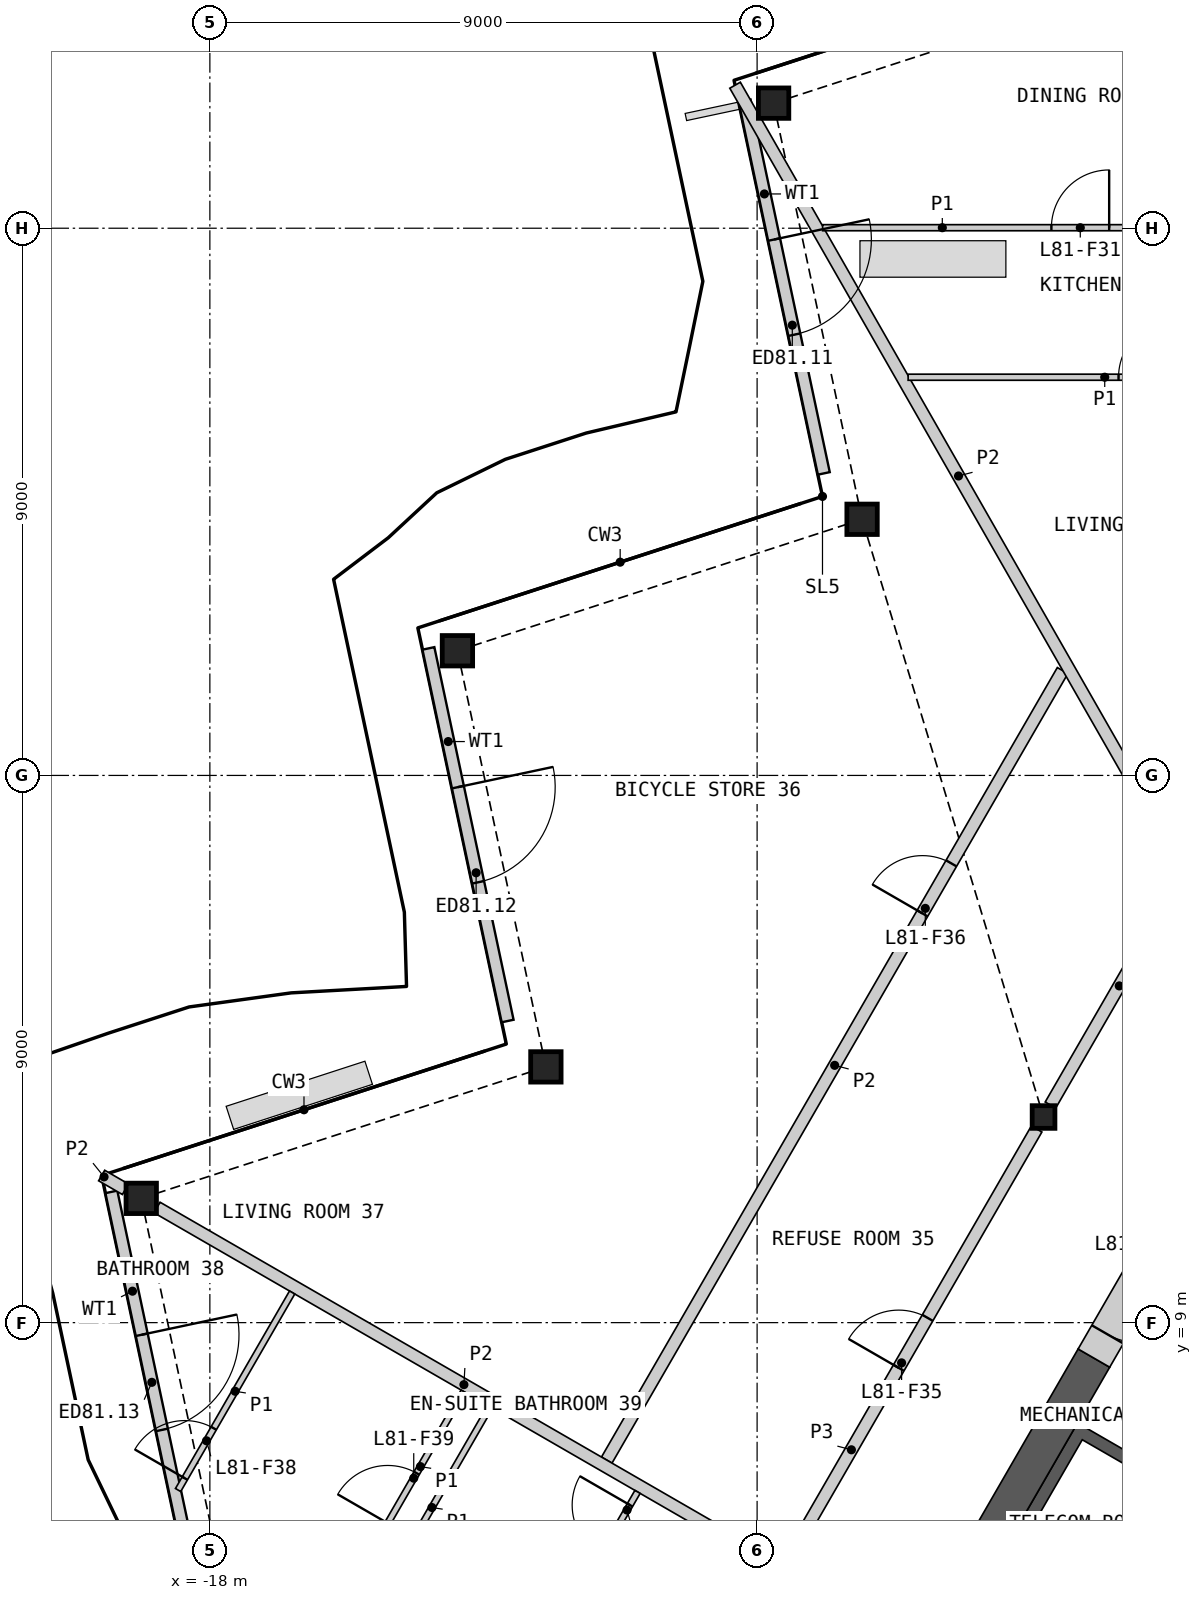
"""IFC4 building model, lengths in metres.
Left out: names, types, materials, properties, quantities, classifications, styles, units other than length and angle.
Written with IfcOpenShell. Run it as: python <this file> out.ifc"""

import sys

from ifc_helpers import new_model, si_unit, direction, frame, frame_2d, origin, origin_2d, place, context, subcontext, project, spatial, polyline, rectangle, hollow_rectangle, i_section, outline, extrude, element, fill, save


model = new_model("IFC4")
c1 = context("Model", 3, precision=1e-05, world=origin(), true_north=direction((0.0, 1.0)))
c2 = subcontext(c1, "Body", "Model", "MODEL_VIEW")
j1 = project(units=[si_unit("LENGTHUNIT", "METRE"), si_unit("PLANEANGLEUNIT", "RADIAN")], contexts=[c1])
p1 = place(None, origin())
s1 = spatial("IfcSite", under=j1, at=p1, CompositionType="ELEMENT")
p2 = place(p1, origin())
s2 = spatial("IfcBuilding", under=s1, at=p2, CompositionType="ELEMENT")
p3 = place(p2, frame((0.0, 0.0, 364.4)))
s3 = spatial("IfcBuildingStorey", under=s2, at=p3, CompositionType="ELEMENT", Elevation=364.4)
for number, where, z_axis, x_axis in (
    (1, (-8.729, 29.057, 0.0), (0.0, 0.0, 1.0), (1.0, 0.0, 0.0)),
    (2, (-7.274, 22.213, 0.0), (0.0, 0.0, 1.0), (1.0, 0.0, 0.0)),
    (3, (-13.929, 20.051, 0.0), (0.0, 0.0, 1.0), (1.0, 0.0, 0.0)),
    (4, (-12.474, 13.206, 0.0), (0.0, 0.0, 1.0), (1.0, 0.0, 0.0)),
    (5, (-19.129, 11.044, 0.0), (0.0, 0.0, 1.0), (1.0, 0.0, 0.0)),
):
    element("IfcColumn", number, at=place(p3, frame(where, z_axis=z_axis, x_axis=x_axis)), inside=s3, PredefinedType="COLUMN", context=c2, shape_type="SweptSolid", body=[
        extrude(hollow_rectangle(XDim=0.5, YDim=0.5, WallThickness=0.03, at=origin_2d()), origin(), (0.0, 0.0, 1.0), 3.4),
    ])
p4 = place(p3, frame((-4.289, 12.382, 0.0), z_axis=(0.0, 0.0, 1.0), x_axis=(1.0, 0.0, 0.0)))
e6 = element("IfcColumn", 6, at=p4, inside=s3, PredefinedType="COLUMN", context=c2, shape_type="SweptSolid", body=[
    extrude(i_section(OverallWidth=0.374, OverallDepth=0.372, WebThickness=0.016, FlangeThickness=0.026, at=origin_2d()), origin(), (0.0, 0.0, 1.0), 3.4),
])
p5 = place(p3, frame((-9.206, 29.096, 0.0), z_axis=(0.0, 0.0, 1.0), x_axis=(0.207889514624, -0.978152314167, 0.0)))
e7 = element("IfcWall", 7, at=p5, inside=s3, PredefinedType="SOLIDWALL", context=c2, shape_type="SweptSolid", body=[
    extrude(rectangle(XDim=6.265, YDim=0.2, at=frame_2d((3.133, 0.0))), origin(), (0.0, 0.0, 1.0), 2.634),
])
p6 = place(p5, frame((2.333, 0.0, 0.0)))
e8 = element("IfcOpeningElement", 8, at=p6, cuts=e7, PredefinedType="OPENING", context=c2, shape_type="SweptSolid", body=[
    extrude(rectangle(XDim=1.6, YDim=2.25, at=frame_2d((0.8, 1.125))), frame((0.0, 0.11, 0.0), z_axis=(0.0, -1.0, 0.0), x_axis=(1.0, 0.0, 0.0)), (0.0, 0.0, 1.0), 0.22),
])
p7 = place(p3, frame((-14.406, 20.089, 0.0), z_axis=(0.0, 0.0, 1.0), x_axis=(0.207889514624, -0.978152314167, 0.0)))
e9 = element("IfcWall", 9, at=p7, inside=s3, PredefinedType="SOLIDWALL", context=c2, shape_type="SweptSolid", body=[
    extrude(rectangle(XDim=6.265, YDim=0.2, at=frame_2d((3.133, 0.0))), origin(), (0.0, 0.0, 1.0), 2.634),
])
p8 = place(p7, frame((2.333, 0.0, 0.0)))
e10 = element("IfcOpeningElement", 10, at=p8, cuts=e9, PredefinedType="OPENING", context=c2, shape_type="SweptSolid", body=[
    extrude(rectangle(XDim=1.6, YDim=2.25, at=frame_2d((0.8, 1.125))), frame((0.0, 0.11, 0.0), z_axis=(0.0, -1.0, 0.0), x_axis=(1.0, 0.0, 0.0)), (0.0, 0.0, 1.0), 0.22),
])
p9 = place(p3, frame((-19.62, 11.15, 0.0), z_axis=(0.0, 0.0, 1.0), x_axis=(0.207933518746, -0.97814296081, 0.0)))
e11 = element("IfcWall", 11, at=p9, inside=s3, PredefinedType="SOLIDWALL", context=c2, shape_type="SweptSolid", body=[
    extrude(rectangle(XDim=6.678, YDim=0.2, at=frame_2d((3.339, 0.0))), origin(), (0.0, 0.0, 1.0), 2.634),
])
p10 = place(p9, frame((2.402, 0.0, 0.0)))
e12 = element("IfcOpeningElement", 12, at=p10, cuts=e11, PredefinedType="OPENING", context=c2, shape_type="SweptSolid", body=[
    extrude(rectangle(XDim=1.6, YDim=2.25, at=frame_2d((0.8, 1.125))), frame((0.0, 0.11, 0.0), z_axis=(0.0, -1.0, 0.0), x_axis=(1.0, 0.0, 0.0)), (0.0, 0.0, 1.0), 0.22),
])
p11 = place(p3, origin())
e13 = element("IfcWall", 13, at=p11, inside=s3, PredefinedType="SHEAR", context=c2, shape_type="SweptSolid", body=[
    extrude(outline(polyline([(-4.96, 0.208), (-7.131, 1.461), (-3.731, 7.35), (-1.561, 6.097), (-1.66, 5.924), (-3.652, 7.074), (-5.752, 3.437), (-3.76, 2.287), (-3.861, 2.113), (-5.852, 3.263), (-6.852, 1.531), (-4.861, 0.381), (-4.96, 0.208)])), origin(), (0.0, 0.0, 1.0), 3.1),
])
p12 = place(p3, frame((-1.631, 5.776, 0.0), z_axis=(0.0, 0.0, 1.0), x_axis=(-0.499992876559, -0.866029516466, 0.0)))
e14 = element("IfcWall", 14, at=p12, inside=s3, PredefinedType="SOLIDWALL", context=c2, shape_type="SweptSolid", body=[
    extrude(rectangle(XDim=6.486, YDim=0.2, at=frame_2d((3.243, 0.0))), origin(), (0.0, 0.0, 1.0), 3.1),
])
p13 = place(p12, frame((1.537, 0.0, 0.0)))
e15 = element("IfcOpeningElement", 15, at=p13, cuts=e14, PredefinedType="OPENING", context=c2, shape_type="SweptSolid", body=[
    extrude(rectangle(XDim=0.9, YDim=2.1, at=frame_2d((0.45, 1.05))), frame((0.0, 0.11, 0.0), z_axis=(0.0, -1.0, 0.0), x_axis=(1.0, 0.0, 0.0)), (0.0, 0.0, 1.0), 0.22),
])
p14 = place(p12, frame((4.837, 0.0, 0.0)))
e16 = element("IfcOpeningElement", 16, at=p14, cuts=e14, PredefinedType="OPENING", context=c2, shape_type="SweptSolid", body=[
    extrude(rectangle(XDim=0.9, YDim=2.1, at=frame_2d((0.45, 1.05))), frame((0.0, 0.11, 0.0), z_axis=(0.0, -1.0, 0.0), x_axis=(1.0, 0.0, 0.0)), (0.0, 0.0, 1.0), 0.22),
])
p15 = place(p3, frame((-3.461, 8.417, 0.0), z_axis=(0.0, 0.0, 1.0), x_axis=(-0.50000391502, -0.866023143435, 0.0)))
e17 = element("IfcWall", 17, at=p15, inside=s3, PredefinedType="SHEAR", context=c2, shape_type="SweptSolid", body=[
    extrude(rectangle(XDim=7.759, YDim=0.6, at=frame_2d((3.879, 0.0))), origin(), (0.0, 0.0, 1.0), 3.1),
])
p16 = place(p3, frame((-2.361, 10.322, 0.0), z_axis=(0.0, 0.0, 1.0), x_axis=(-0.499946605688, -0.86605622881, 0.0)))
e18 = element("IfcWall", 18, at=p16, inside=s3, PredefinedType="SHEAR", context=c2, shape_type="SweptSolid", body=[
    extrude(rectangle(XDim=2.2, YDim=0.6, at=frame_2d((1.1, 0.0))), origin(), (0.0, 0.0, 1.0), 3.1),
])
p17 = place(p16, frame((0.75, 0.0, 0.0)))
e19 = element("IfcOpeningElement", 19, at=p17, cuts=e18, PredefinedType="OPENING", context=c2, shape_type="SweptSolid", body=[
    extrude(rectangle(XDim=1.0, YDim=2.1, at=frame_2d((0.5, 1.05))), frame((0.0, 0.31, 0.0), z_axis=(0.0, -1.0, 0.0), x_axis=(1.0, 0.0, 0.0)), (0.0, 0.0, 1.0), 0.62),
])
p18 = place(p3, frame((-8.465, 5.15, 0.0), z_axis=(0.0, 0.0, 1.0), x_axis=(0.499992155518, 0.866029932751, 0.0)))
e20 = element("IfcWall", 20, at=p18, inside=s3, PredefinedType="PARTITIONING", context=c2, shape_type="SweptSolid", body=[
    extrude(rectangle(XDim=8.123, YDim=0.2, at=frame_2d((4.062, 0.0))), origin(), (0.0, 0.0, 1.0), 3.1),
])
p19 = place(p18, frame((3.587, 0.0, 0.0)))
e21 = element("IfcOpeningElement", 21, at=p19, cuts=e20, PredefinedType="OPENING", context=c2, shape_type="SweptSolid", body=[
    extrude(rectangle(XDim=0.95, YDim=2.1, at=frame_2d((0.475, 1.05))), frame((0.0, 0.11, 0.0), z_axis=(0.0, -1.0, 0.0), x_axis=(1.0, 0.0, 0.0)), (0.0, 0.0, 1.0), 0.22),
])
p20 = place(p3, frame((-4.176, 12.579, 0.0), z_axis=(0.0, 0.0, 1.0), x_axis=(0.499974648164, 0.866040040179, 0.0)))
e22 = element("IfcWall", 22, at=p20, inside=s3, PredefinedType="PARTITIONING", context=c2, shape_type="SweptSolid", body=[
    extrude(rectangle(XDim=4.525, YDim=0.2, at=frame_2d((2.263, 0.0))), origin(), (0.0, 0.0, 1.0), 3.1),
])
p21 = place(p3, frame((-11.473, 6.74, 0.0), z_axis=(0.0, 0.0, 1.0), x_axis=(0.499993542657, 0.866029131901, 0.0)))
e23 = element("IfcWall", 23, at=p21, inside=s3, PredefinedType="PARTITIONING", context=c2, shape_type="SweptSolid", body=[
    extrude(rectangle(XDim=14.994, YDim=0.2, at=frame_2d((7.497, 0.0))), origin(), (0.0, 0.0, 1.0), 2.33),
])
p22 = place(p21, frame((10.383, 0.0, 0.0)))
e24 = element("IfcOpeningElement", 24, at=p22, cuts=e23, PredefinedType="OPENING", context=c2, shape_type="SweptSolid", body=[
    extrude(rectangle(XDim=0.95, YDim=2.1, at=frame_2d((0.475, 1.05))), frame((0.0, 0.11, 0.0), z_axis=(0.0, -1.0, 0.0), x_axis=(1.0, 0.0, 0.0)), (0.0, 0.0, 1.0), 0.22),
])
p23 = place(p3, frame((-9.362, 29.352, 0.0), z_axis=(0.0, 0.0, 1.0), x_axis=(0.496351997927, -0.868121359116, 0.0)))
e25 = element("IfcWall", 25, at=p23, inside=s3, PredefinedType="PARTITIONING", context=c2, shape_type="SweptSolid", body=[
    extrude(rectangle(XDim=14.807, YDim=0.2, at=frame_2d((7.404, 0.0))), origin(), (0.0, 0.0, 1.0), 2.33),
])
p24 = place(p3, frame((-18.869, 10.894, 0.0), z_axis=(0.0, 0.0, 1.0), x_axis=(0.866023724155, -0.500002909193, 0.0)))
e26 = element("IfcWall", 26, at=p24, inside=s3, PredefinedType="PARTITIONING", context=c2, shape_type="SweptSolid", body=[
    extrude(rectangle(XDim=11.655, YDim=0.2, at=frame_2d((5.827, 0.0))), origin(), (0.0, 0.0, 1.0), 2.33),
])
p25 = place(p3, frame((-19.78, 11.42, 0.0), z_axis=(0.0, 0.0, 1.0), x_axis=(0.866104518135, -0.499862944882, 0.0)))
e27 = element("IfcWall", 27, at=p25, inside=s3, PredefinedType="PARTITIONING", context=c2, shape_type="SweptSolid", body=[
    extrude(rectangle(XDim=0.451, YDim=0.2, at=frame_2d((0.226, 0.0))), origin(), (0.0, 0.0, 1.0), 2.33),
])
p26 = place(p3, frame((-7.922, 27.009, 0.0), z_axis=(0.0, 0.0, 1.0), x_axis=(1.0, 0.0, 0.0)))
e28 = element("IfcWall", 28, at=p26, inside=s3, PredefinedType="PARTITIONING", context=c2, shape_type="SweptSolid", body=[
    extrude(rectangle(XDim=7.872, YDim=0.1, at=frame_2d((3.936, 0.0))), origin(), (0.0, 0.0, 1.0), 2.33),
])
p27 = place(p26, frame((3.762, 0.0, 0.0)))
e29 = element("IfcOpeningElement", 29, at=p27, cuts=e28, PredefinedType="OPENING", context=c2, shape_type="SweptSolid", body=[
    extrude(rectangle(XDim=0.95, YDim=2.1, at=frame_2d((0.475, 1.05))), frame((0.0, 0.06, 0.0), z_axis=(0.0, -1.0, 0.0), x_axis=(1.0, 0.0, 0.0)), (0.0, 0.0, 1.0), 0.12),
])
p28 = place(p3, frame((-6.516, 24.549, 0.0), z_axis=(0.0, 0.0, 1.0), x_axis=(1.0, 0.0, 0.0)))
e30 = element("IfcWall", 30, at=p28, inside=s3, PredefinedType="PARTITIONING", context=c2, shape_type="SweptSolid", body=[
    extrude(rectangle(XDim=6.466, YDim=0.1, at=frame_2d((3.233, 0.0))), origin(), (0.0, 0.0, 1.0), 2.33),
])
p29 = place(p28, frame((3.46, 0.0, 0.0)))
e31 = element("IfcOpeningElement", 31, at=p29, cuts=e30, PredefinedType="OPENING", context=c2, shape_type="SweptSolid", body=[
    extrude(rectangle(XDim=0.95, YDim=2.1, at=frame_2d((0.475, 1.05))), frame((0.0, 0.06, 0.0), z_axis=(0.0, -1.0, 0.0), x_axis=(1.0, 0.0, 0.0)), (0.0, 0.0, 1.0), 0.12),
])
p30 = place(p3, frame((-18.523, 6.247, 0.0), z_axis=(0.0, 0.0, 1.0), x_axis=(0.499981580887, 0.866036037803, 0.0)))
e32 = element("IfcWall", 32, at=p30, inside=s3, PredefinedType="PARTITIONING", context=c2, shape_type="SweptSolid", body=[
    extrude(rectangle(XDim=3.752, YDim=0.1, at=frame_2d((1.876, 0.0))), origin(), (0.0, 0.0, 1.0), 2.33),
])
p31 = place(p30, frame((0.222, 0.0, 0.0)))
e33 = element("IfcOpeningElement", 33, at=p31, cuts=e32, PredefinedType="OPENING", context=c2, shape_type="SweptSolid", body=[
    extrude(rectangle(XDim=0.95, YDim=2.1, at=frame_2d((0.475, 1.05))), frame((0.0, 0.06, 0.0), z_axis=(0.0, -1.0, 0.0), x_axis=(1.0, 0.0, 0.0)), (0.0, 0.0, 1.0), 0.12),
])
p32 = place(p3, frame((-15.25, 5.398, 0.0), z_axis=(0.0, 0.0, 1.0), x_axis=(0.499935029643, 0.866062911188, 0.0)))
e34 = element("IfcWall", 34, at=p32, inside=s3, PredefinedType="PARTITIONING", context=c2, shape_type="SweptSolid", body=[
    extrude(rectangle(XDim=2.85, YDim=0.1, at=frame_2d((1.425, 0.0))), origin(), (0.0, 0.0, 1.0), 2.33),
])
p33 = place(p32, frame((0.35, 0.0, 0.0)))
e35 = element("IfcOpeningElement", 35, at=p33, cuts=e34, PredefinedType="OPENING", context=c2, shape_type="SweptSolid", body=[
    extrude(rectangle(XDim=0.95, YDim=2.1, at=frame_2d((0.475, 1.05))), frame((0.0, 0.06, 0.0), z_axis=(0.0, -1.0, 0.0), x_axis=(1.0, 0.0, 0.0)), (0.0, 0.0, 1.0), 0.12),
])
p34 = place(p3, frame((-12.242, 4.008, 0.0), z_axis=(0.0, 0.0, 1.0), x_axis=(0.499948979701, 0.866054858364, 0.0)))
e36 = element("IfcWall", 36, at=p34, inside=s3, PredefinedType="PARTITIONING", context=c2, shape_type="SweptSolid", body=[
    extrude(rectangle(XDim=2.55, YDim=0.1, at=frame_2d((1.275, 0.0))), origin(), (0.0, 0.0, 1.0), 2.33),
])
p35 = place(p34, frame((1.35, 0.0, 0.0)))
e37 = element("IfcOpeningElement", 37, at=p35, cuts=e36, PredefinedType="OPENING", context=c2, shape_type="SweptSolid", body=[
    extrude(rectangle(XDim=0.95, YDim=2.1, at=frame_2d((0.475, 1.05))), frame((0.0, 0.06, 0.0), z_axis=(0.0, -1.0, 0.0), x_axis=(1.0, 0.0, 0.0)), (0.0, 0.0, 1.0), 0.12),
])
p36 = place(p3, frame((-14.667, 5.408, 0.0), z_axis=(0.0, 0.0, 1.0), x_axis=(0.499948979701, 0.866054858364, 0.0)))
e38 = element("IfcWall", 38, at=p36, inside=s3, PredefinedType="PARTITIONING", context=c2, shape_type="SweptSolid", body=[
    extrude(rectangle(XDim=2.55, YDim=0.1, at=frame_2d((1.275, 0.0))), origin(), (0.0, 0.0, 1.0), 2.33),
])
p37 = place(p6, origin())
e39 = element("IfcDoor", 39, at=p37, inside=s3, OperationType="DOUBLE_DOOR_SINGLE_SWING", PredefinedType="DOOR", context=c2, shape_type="SweptSolid", body=[
    extrude(rectangle(XDim=1.6, YDim=2.25, at=frame_2d((0.8, 1.125))), frame((0.0, 0.025, 0.0), z_axis=(0.0, -1.0, 0.0), x_axis=(1.0, 0.0, 0.0)), (0.0, 0.0, 1.0), 0.05),
])
fill(e8, e39)
p38 = place(p8, origin())
e40 = element("IfcDoor", 40, at=p38, inside=s3, OperationType="DOUBLE_DOOR_SINGLE_SWING", PredefinedType="DOOR", context=c2, shape_type="SweptSolid", body=[
    extrude(rectangle(XDim=1.6, YDim=2.25, at=frame_2d((0.8, 1.125))), frame((0.0, 0.025, 0.0), z_axis=(0.0, -1.0, 0.0), x_axis=(1.0, 0.0, 0.0)), (0.0, 0.0, 1.0), 0.05),
])
fill(e10, e40)
p39 = place(p10, origin())
e41 = element("IfcDoor", 41, at=p39, inside=s3, OperationType="DOUBLE_DOOR_SINGLE_SWING", PredefinedType="DOOR", context=c2, shape_type="SweptSolid", body=[
    extrude(rectangle(XDim=1.6, YDim=2.25, at=frame_2d((0.8, 1.125))), frame((0.0, 0.025, 0.0), z_axis=(0.0, -1.0, 0.0), x_axis=(1.0, 0.0, 0.0)), (0.0, 0.0, 1.0), 0.05),
])
fill(e12, e41)
p40 = place(p17, origin())
e42 = element("IfcDoor", 42, at=p40, inside=s3, OperationType="SINGLE_SWING_LEFT", PredefinedType="DOOR", context=c2, shape_type="SweptSolid", body=[
    extrude(rectangle(XDim=1.0, YDim=2.1, at=frame_2d((0.5, 1.05))), frame((0.0, 0.055, 0.0), z_axis=(0.0, -1.0, 0.0), x_axis=(1.0, 0.0, 0.0)), (0.0, 0.0, 1.0), 0.05),
])
fill(e19, e42)
p41 = place(p29, origin())
e43 = element("IfcDoor", 43, at=p41, inside=s3, OperationType="SINGLE_SWING_RIGHT", PredefinedType="DOOR", context=c2, shape_type="SweptSolid", body=[
    extrude(rectangle(XDim=0.95, YDim=2.1, at=frame_2d((0.475, 1.05))), frame((0.0, 0.025, 0.0), z_axis=(0.0, -1.0, 0.0), x_axis=(1.0, 0.0, 0.0)), (0.0, 0.0, 1.0), 0.05),
])
fill(e31, e43)
p42 = place(p27, origin())
e44 = element("IfcDoor", 44, at=p42, inside=s3, OperationType="SINGLE_SWING_RIGHT", PredefinedType="DOOR", context=c2, shape_type="SweptSolid", body=[
    extrude(rectangle(XDim=0.95, YDim=2.1, at=frame_2d((0.475, 1.05))), frame((0.0, 0.025, 0.0), z_axis=(0.0, -1.0, 0.0), x_axis=(1.0, 0.0, 0.0)), (0.0, 0.0, 1.0), 0.05),
])
fill(e29, e44)
p43 = place(p19, origin())
e45 = element("IfcDoor", 45, at=p43, inside=s3, OperationType="SINGLE_SWING_LEFT", PredefinedType="DOOR", context=c2, shape_type="SweptSolid", body=[
    extrude(rectangle(XDim=0.95, YDim=2.1, at=frame_2d((0.475, 1.05))), frame((0.0, 0.025, 0.0), z_axis=(0.0, -1.0, 0.0), x_axis=(1.0, 0.0, 0.0)), (0.0, 0.0, 1.0), 0.05),
])
fill(e21, e45)
p44 = place(p22, origin())
e46 = element("IfcDoor", 46, at=p44, inside=s3, OperationType="SINGLE_SWING_LEFT", PredefinedType="DOOR", context=c2, shape_type="SweptSolid", body=[
    extrude(rectangle(XDim=0.95, YDim=2.1, at=frame_2d((0.475, 1.05))), frame((0.0, 0.025, 0.0), z_axis=(0.0, -1.0, 0.0), x_axis=(1.0, 0.0, 0.0)), (0.0, 0.0, 1.0), 0.05),
])
fill(e24, e46)
p45 = place(p31, origin())
e47 = element("IfcDoor", 47, at=p45, inside=s3, OperationType="SINGLE_SWING_LEFT", PredefinedType="DOOR", context=c2, shape_type="SweptSolid", body=[
    extrude(rectangle(XDim=0.95, YDim=2.1, at=frame_2d((0.475, 1.05))), frame((0.0, 0.025, 0.0), z_axis=(0.0, -1.0, 0.0), x_axis=(1.0, 0.0, 0.0)), (0.0, 0.0, 1.0), 0.05),
])
fill(e33, e47)
p46 = place(p33, origin())
e48 = element("IfcDoor", 48, at=p46, inside=s3, OperationType="SINGLE_SWING_LEFT", PredefinedType="DOOR", context=c2, shape_type="SweptSolid", body=[
    extrude(rectangle(XDim=0.95, YDim=2.1, at=frame_2d((0.475, 1.05))), frame((0.0, 0.025, 0.0), z_axis=(0.0, -1.0, 0.0), x_axis=(1.0, 0.0, 0.0)), (0.0, 0.0, 1.0), 0.05),
])
fill(e35, e48)
p47 = place(p35, origin())
e49 = element("IfcDoor", 49, at=p47, inside=s3, OperationType="SINGLE_SWING_RIGHT", PredefinedType="DOOR", context=c2, shape_type="SweptSolid", body=[
    extrude(rectangle(XDim=0.95, YDim=2.1, at=frame_2d((0.475, 1.05))), frame((0.0, 0.025, 0.0), z_axis=(0.0, -1.0, 0.0), x_axis=(1.0, 0.0, 0.0)), (0.0, 0.0, 1.0), 0.05),
])
fill(e37, e49)
save(model, sys.argv[1])
